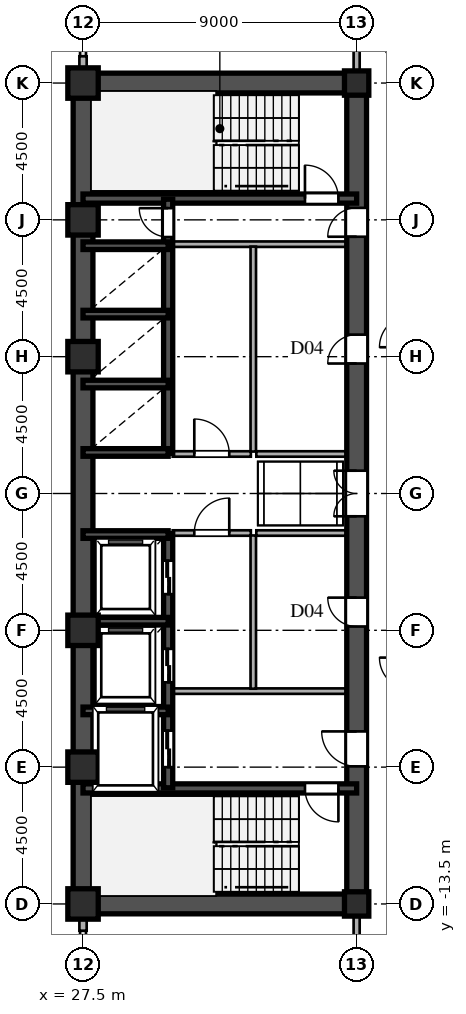
"""IFC4 building model, lengths in metres.
Left out: names, types, materials, properties, quantities, classifications, styles, units other than length and angle.
Written with IfcOpenShell. Run it as: python <this file> out.ifc"""

import sys

from ifc_helpers import new_model, si_unit, direction, frame, frame_2d, origin, origin_2d, place, context, subcontext, project, spatial, rectangle, hollow_rectangle, i_section, extrude, source, transform, mapped, element, fill, save


model = new_model("IFC4")
c1 = context("Model", 3, precision=1e-05, world=origin(), true_north=direction((0.0, 1.0)))
c2 = subcontext(c1, "Body", "Model", "MODEL_VIEW")
j1 = project(units=[si_unit("LENGTHUNIT", "METRE"), si_unit("PLANEANGLEUNIT", "RADIAN")], contexts=[c1])
p1 = place(None, origin())
s1 = spatial("IfcSite", under=j1, at=p1, CompositionType="ELEMENT")
p2 = place(p1, origin())
s2 = spatial("IfcBuilding", under=s1, at=p2, CompositionType="ELEMENT")
p3 = place(p2, frame((0.0, 0.0, 83.7)))
s3 = spatial("IfcBuildingStorey", under=s2, at=p3, CompositionType="ELEMENT", Elevation=83.7)
m1 = source(origin(), c2, "Body", "SweptSolid", [
    extrude(hollow_rectangle(XDim=1.0, YDim=1.0, WallThickness=0.042, at=origin_2d()), origin(), (0.0, 0.0, 1.0), 3.6),
])
for number, where, z_axis, x_axis in (
    (1, (27.5, -13.5, 0.0), (0.0, 0.0, 1.0), (1.0, 0.0, 0.0)),
    (2, (27.5, -9.0, 0.0), (0.0, 0.0, 1.0), (1.0, 0.0, 0.0)),
    (3, (27.5, -4.5, 0.0), (0.0, 0.0, 1.0), (1.0, 0.0, 0.0)),
    (4, (27.5, 4.5, 0.0), (0.0, 0.0, 1.0), (1.0, 0.0, 0.0)),
    (5, (27.5, 9.0, 0.0), (0.0, 0.0, 1.0), (1.0, 0.0, 0.0)),
    (6, (27.5, 13.5, 0.0), (0.0, 0.0, 1.0), (1.0, 0.0, 0.0)),
):
    element("IfcColumn", number, at=place(p3, frame(where, z_axis=z_axis, x_axis=x_axis)), inside=s3, PredefinedType="COLUMN", context=c2, shape_type="MappedRepresentation", body=[
        mapped(m1, transform((0.0, 0.0, 0.0), scale=1.0)),
    ])
m2 = source(origin(), c2, "Body", "SweptSolid", [
    extrude(i_section(OverallWidth=0.8, OverallDepth=0.8, WebThickness=0.032, FlangeThickness=0.05, at=origin_2d()), origin(), (0.0, 0.0, 1.0), 3.6),
])
for number, where, z_axis, x_axis in (
    (7, (36.5, -13.5, 0.0), (0.0, 0.0, 1.0), (1.0, 0.0, 0.0)),
    (8, (36.5, 13.5, 0.0), (0.0, 0.0, 1.0), (1.0, 0.0, 0.0)),
):
    element("IfcColumn", number, at=place(p3, frame(where, z_axis=z_axis, x_axis=x_axis)), inside=s3, PredefinedType="COLUMN", context=c2, shape_type="MappedRepresentation", body=[
        mapped(m2, transform((0.0, 0.0, 0.0), scale=1.0)),
    ])
for number, where, z_axis, x_axis in (
    (9, (27.5, -14.38, 0.0), (0.0, 0.0, 1.0), (0.0, 1.0, 0.0)),
    (10, (27.5, 13.83, 0.0), (0.0, 0.0, 1.0), (0.0, 1.0, 0.0)),
):
    element("IfcWall", number, at=place(p3, frame(where, z_axis=z_axis, x_axis=x_axis)), inside=s3, PredefinedType="SOLIDWALL", context=c2, shape_type="SweptSolid", body=[
        extrude(rectangle(XDim=0.55, YDim=0.24, at=frame_2d((0.275, 0.0))), origin(), (0.0, 0.0, 1.0), 2.84),
    ])
for number, where, z_axis, x_axis in (
    (11, (27.5, -13.5, 0.0), (0.0, 0.0, 1.0), (0.0, 1.0, 0.0)),
    (12, (27.5, 1.3, 0.0), (0.0, 0.0, 1.0), (0.0, 1.0, 0.0)),
):
    element("IfcWall", number, at=place(p3, frame(where, z_axis=z_axis, x_axis=x_axis)), inside=s3, PredefinedType="SHEAR", context=c2, shape_type="SweptSolid", body=[
        extrude(rectangle(XDim=12.2, YDim=0.65, at=frame_2d((6.1, 0.0))), origin(), (0.0, 0.0, 1.0), 3.34),
    ])
p4 = place(p3, frame((27.5, -1.3, 0.0), z_axis=(0.0, 0.0, 1.0), x_axis=(0.0, 1.0, 0.0)))
e13 = element("IfcWall", 13, at=p4, inside=s3, PredefinedType="SHEAR", context=c2, shape_type="SweptSolid", body=[
    extrude(rectangle(XDim=2.6, YDim=0.65, at=frame_2d((1.3, 0.0))), origin(), (0.0, 0.0, 1.0), 3.34),
])
for number, where, z_axis, x_axis in (
    (14, (27.5, -13.5, 0.0), (0.0, 0.0, 1.0), (1.0, 0.0, 0.0)),
    (15, (27.5, 13.5, 0.0), (0.0, 0.0, 1.0), (1.0, 0.0, 0.0)),
):
    element("IfcWall", number, at=place(p3, frame(where, z_axis=z_axis, x_axis=x_axis)), inside=s3, PredefinedType="SHEAR", context=c2, shape_type="SweptSolid", body=[
        extrude(rectangle(XDim=9.0, YDim=0.65, at=frame_2d((4.5, 0.0))), origin(), (0.0, 0.0, 1.0), 3.34),
    ])
p5 = place(p3, frame((36.5, -13.65, 0.0), z_axis=(0.0, 0.0, 1.0), x_axis=(0.0, 1.0, 0.0)))
e16 = element("IfcWall", 16, at=p5, inside=s3, PredefinedType="SHEAR", context=c2, shape_type="SweptSolid", body=[
    extrude(rectangle(XDim=7.15, YDim=0.65, at=frame_2d((3.575, 0.0))), origin(), (0.0, 0.0, 1.0), 3.34),
])
p6 = place(p5, frame((4.675, 0.0, 0.0)))
e17 = element("IfcOpeningElement", 17, at=p6, cuts=e16, PredefinedType="OPENING", context=c2, shape_type="SweptSolid", body=[
    extrude(rectangle(XDim=1.15, YDim=2.2, at=frame_2d((0.575, 1.1))), frame((0.0, 0.335, 0.0), z_axis=(0.0, -1.0, 0.0), x_axis=(1.0, 0.0, 0.0)), (0.0, 0.0, 1.0), 0.67),
])
p7 = place(p3, frame((36.5, -1.3, 0.0), z_axis=(0.0, 0.0, 1.0), x_axis=(0.0, 1.0, 0.0)))
e18 = element("IfcWall", 18, at=p7, inside=s3, PredefinedType="SHEAR", context=c2, shape_type="SweptSolid", body=[
    extrude(rectangle(XDim=2.6, YDim=0.65, at=frame_2d((1.3, 0.0))), origin(), (0.0, 0.0, 1.0), 3.34),
])
p8 = place(p7, frame((0.55, 0.0, 0.0)))
e19 = element("IfcOpeningElement", 19, at=p8, cuts=e18, PredefinedType="OPENING", context=c2, shape_type="SweptSolid", body=[
    extrude(rectangle(XDim=1.5, YDim=2.3, at=frame_2d((0.75, 1.15))), frame((0.0, 0.335, 0.0), z_axis=(0.0, -1.0, 0.0), x_axis=(1.0, 0.0, 0.0)), (0.0, 0.0, 1.0), 0.67),
])
p9 = place(p3, frame((36.5, 8.2, 0.0), z_axis=(0.0, 0.0, 1.0), x_axis=(0.0, 1.0, 0.0)))
e20 = element("IfcWall", 20, at=p9, inside=s3, PredefinedType="SHEAR", context=c2, shape_type="SweptSolid", body=[
    extrude(rectangle(XDim=5.45, YDim=0.65, at=frame_2d((2.725, 0.0))), origin(), (0.0, 0.0, 1.0), 3.34),
])
p10 = place(p9, frame((0.245, 0.0, 0.0)))
e21 = element("IfcOpeningElement", 21, at=p10, cuts=e20, PredefinedType="OPENING", context=c2, shape_type="SweptSolid", body=[
    extrude(rectangle(XDim=0.95, YDim=2.15, at=frame_2d((0.475, 1.075))), frame((0.0, 0.335, 0.0), z_axis=(0.0, -1.0, 0.0), x_axis=(1.0, 0.0, 0.0)), (0.0, 0.0, 1.0), 0.67),
])
p11 = place(p3, frame((36.5, -6.5, 0.0), z_axis=(0.0, 0.0, 1.0), x_axis=(0.0, 1.0, 0.0)))
e22 = element("IfcWall", 22, at=p11, inside=s3, PredefinedType="SHEAR", context=c2, shape_type="SweptSolid", body=[
    extrude(rectangle(XDim=5.2, YDim=0.65, at=frame_2d((2.6, 0.0))), origin(), (0.0, 0.0, 1.0), 3.34),
])
p12 = place(p11, frame((2.125, 0.0, 0.0)))
e23 = element("IfcOpeningElement", 23, at=p12, cuts=e22, PredefinedType="OPENING", context=c2, shape_type="SweptSolid", body=[
    extrude(rectangle(XDim=0.95, YDim=2.15, at=frame_2d((0.475, 1.075))), frame((0.0, 0.335, 0.0), z_axis=(0.0, -1.0, 0.0), x_axis=(1.0, 0.0, 0.0)), (0.0, 0.0, 1.0), 0.67),
])
p13 = place(p3, frame((36.5, 1.3, 0.0), z_axis=(0.0, 0.0, 1.0), x_axis=(0.0, 1.0, 0.0)))
e24 = element("IfcWall", 24, at=p13, inside=s3, PredefinedType="SHEAR", context=c2, shape_type="SweptSolid", body=[
    extrude(rectangle(XDim=6.9, YDim=0.65, at=frame_2d((3.45, 0.0))), origin(), (0.0, 0.0, 1.0), 3.34),
])
p14 = place(p13, frame((2.975, 0.0, 0.0)))
e25 = element("IfcOpeningElement", 25, at=p14, cuts=e24, PredefinedType="OPENING", context=c2, shape_type="SweptSolid", body=[
    extrude(rectangle(XDim=0.95, YDim=2.15, at=frame_2d((0.475, 1.075))), frame((0.0, 0.335, 0.0), z_axis=(0.0, -1.0, 0.0), x_axis=(1.0, 0.0, 0.0)), (0.0, 0.0, 1.0), 0.67),
])
p15 = place(p3, frame((27.5, -9.7, 0.0), z_axis=(0.0, 0.0, 1.0), x_axis=(1.0, 0.0, 0.0)))
e26 = element("IfcWall", 26, at=p15, inside=s3, PredefinedType="SHEAR", context=c2, shape_type="SweptSolid", body=[
    extrude(rectangle(XDim=9.0, YDim=0.3, at=frame_2d((4.5, 0.0))), origin(), (0.0, 0.0, 1.0), 3.34),
])
p16 = place(p15, frame((7.3, 0.0, 0.0)))
e27 = element("IfcOpeningElement", 27, at=p16, cuts=e26, PredefinedType="OPENING", context=c2, shape_type="SweptSolid", body=[
    extrude(rectangle(XDim=1.1, YDim=2.2, at=frame_2d((0.55, 1.1))), frame((0.0, 0.16, 0.0), z_axis=(0.0, -1.0, 0.0), x_axis=(1.0, 0.0, 0.0)), (0.0, 0.0, 1.0), 0.32),
])
p17 = place(p3, frame((27.5, 9.7, 0.0), z_axis=(0.0, 0.0, 1.0), x_axis=(1.0, 0.0, 0.0)))
e28 = element("IfcWall", 28, at=p17, inside=s3, PredefinedType="SHEAR", context=c2, shape_type="SweptSolid", body=[
    extrude(rectangle(XDim=9.0, YDim=0.3, at=frame_2d((4.5, 0.0))), origin(), (0.0, 0.0, 1.0), 3.34),
])
p18 = place(p17, frame((7.3, 0.0, 0.0)))
e29 = element("IfcOpeningElement", 29, at=p18, cuts=e28, PredefinedType="OPENING", context=c2, shape_type="SweptSolid", body=[
    extrude(rectangle(XDim=1.1, YDim=2.2, at=frame_2d((0.55, 1.1))), frame((0.0, 0.16, 0.0), z_axis=(0.0, -1.0, 0.0), x_axis=(1.0, 0.0, 0.0)), (0.0, 0.0, 1.0), 0.32),
])
for number, where, z_axis, x_axis in (
    (30, (27.5, -7.15, 0.0), (0.0, 0.0, 1.0), (1.0, 0.0, 0.0)),
    (31, (27.5, -4.2, 0.0), (0.0, 0.0, 1.0), (1.0, 0.0, 0.0)),
    (32, (27.5, -1.35, 0.0), (0.0, 0.0, 1.0), (1.0, 0.0, 0.0)),
    (33, (27.5, 1.35, 0.0), (0.0, 0.0, 1.0), (1.0, 0.0, 0.0)),
    (34, (27.5, 3.6, 0.0), (0.0, 0.0, 1.0), (1.0, 0.0, 0.0)),
    (35, (27.5, 5.9, 0.0), (0.0, 0.0, 1.0), (1.0, 0.0, 0.0)),
    (36, (27.5, 8.15, 0.0), (0.0, 0.0, 1.0), (1.0, 0.0, 0.0)),
):
    element("IfcWall", number, at=place(p3, frame(where, z_axis=z_axis, x_axis=x_axis)), inside=s3, PredefinedType="SHEAR", context=c2, shape_type="SweptSolid", body=[
        extrude(rectangle(XDim=2.8, YDim=0.25, at=frame_2d((1.4, 0.0))), origin(), (0.0, 0.0, 1.0), 3.34),
    ])
p19 = place(p3, frame((30.3, -9.68, 0.0), z_axis=(0.0, 0.0, 1.0), x_axis=(0.0, 1.0, 0.0)))
e37 = element("IfcWall", 37, at=p19, inside=s3, PredefinedType="SHEAR", context=c2, shape_type="SweptSolid", body=[
    extrude(rectangle(XDim=2.56, YDim=0.3, at=frame_2d((1.28, 0.0))), origin(), (0.0, 0.0, 1.0), 3.34),
])
p20 = place(p19, frame((0.68, 0.0, 0.0)))
e38 = element("IfcOpeningElement", 38, at=p20, cuts=e37, PredefinedType="OPENING", context=c2, shape_type="SweptSolid", body=[
    extrude(rectangle(XDim=1.2, YDim=2.25, at=frame_2d((0.6, 1.125))), frame((0.0, 0.16, 0.0), z_axis=(0.0, -1.0, 0.0), x_axis=(1.0, 0.0, 0.0)), (0.0, 0.0, 1.0), 0.32),
])
p21 = place(p3, frame((30.3, -7.12, 0.0), z_axis=(0.0, 0.0, 1.0), x_axis=(0.0, 1.0, 0.0)))
e39 = element("IfcWall", 39, at=p21, inside=s3, PredefinedType="SHEAR", context=c2, shape_type="SweptSolid", body=[
    extrude(rectangle(XDim=2.92, YDim=0.3, at=frame_2d((1.46, 0.0))), origin(), (0.0, 0.0, 1.0), 3.34),
])
p22 = place(p21, frame((0.91, 0.0, 0.0)))
e40 = element("IfcOpeningElement", 40, at=p22, cuts=e39, PredefinedType="OPENING", context=c2, shape_type="SweptSolid", body=[
    extrude(rectangle(XDim=1.1, YDim=2.2, at=frame_2d((0.55, 1.1))), frame((0.0, 0.16, 0.0), z_axis=(0.0, -1.0, 0.0), x_axis=(1.0, 0.0, 0.0)), (0.0, 0.0, 1.0), 0.32),
])
p23 = place(p3, frame((30.3, -4.2, 0.0), z_axis=(0.0, 0.0, 1.0), x_axis=(0.0, 1.0, 0.0)))
e41 = element("IfcWall", 41, at=p23, inside=s3, PredefinedType="SHEAR", context=c2, shape_type="SweptSolid", body=[
    extrude(rectangle(XDim=2.88, YDim=0.3, at=frame_2d((1.44, 0.0))), origin(), (0.0, 0.0, 1.0), 3.34),
])
p24 = place(p23, frame((0.89, 0.0, 0.0)))
e42 = element("IfcOpeningElement", 42, at=p24, cuts=e41, PredefinedType="OPENING", context=c2, shape_type="SweptSolid", body=[
    extrude(rectangle(XDim=1.1, YDim=2.2, at=frame_2d((0.55, 1.1))), frame((0.0, 0.16, 0.0), z_axis=(0.0, -1.0, 0.0), x_axis=(1.0, 0.0, 0.0)), (0.0, 0.0, 1.0), 0.32),
])
p25 = place(p3, frame((30.3, 1.32, 0.0), z_axis=(0.0, 0.0, 1.0), x_axis=(0.0, 1.0, 0.0)))
e43 = element("IfcWall", 43, at=p25, inside=s3, PredefinedType="SHEAR", context=c2, shape_type="SweptSolid", body=[
    extrude(rectangle(XDim=2.28, YDim=0.3, at=frame_2d((1.14, 0.0))), origin(), (0.0, 0.0, 1.0), 3.34),
])
p26 = place(p3, frame((30.3, 3.6, 0.0), z_axis=(0.0, 0.0, 1.0), x_axis=(0.0, 1.0, 0.0)))
e44 = element("IfcWall", 44, at=p26, inside=s3, PredefinedType="SHEAR", context=c2, shape_type="SweptSolid", body=[
    extrude(rectangle(XDim=2.3, YDim=0.3, at=frame_2d((1.15, 0.0))), origin(), (0.0, 0.0, 1.0), 3.34),
])
p27 = place(p3, frame((30.3, 5.9, 0.0), z_axis=(0.0, 0.0, 1.0), x_axis=(0.0, 1.0, 0.0)))
e45 = element("IfcWall", 45, at=p27, inside=s3, PredefinedType="SHEAR", context=c2, shape_type="SweptSolid", body=[
    extrude(rectangle(XDim=2.25, YDim=0.3, at=frame_2d((1.125, 0.0))), origin(), (0.0, 0.0, 1.0), 3.34),
])
p28 = place(p3, frame((30.3, 8.15, 0.0), z_axis=(0.0, 0.0, 1.0), x_axis=(0.0, 1.0, 0.0)))
e46 = element("IfcWall", 46, at=p28, inside=s3, PredefinedType="SHEAR", context=c2, shape_type="SweptSolid", body=[
    extrude(rectangle(XDim=1.53, YDim=0.3, at=frame_2d((0.765, 0.0))), origin(), (0.0, 0.0, 1.0), 3.34),
])
p29 = place(p28, frame((0.285, 0.0, 0.0)))
e47 = element("IfcOpeningElement", 47, at=p29, cuts=e46, PredefinedType="OPENING", context=c2, shape_type="SweptSolid", body=[
    extrude(rectangle(XDim=0.95, YDim=2.15, at=frame_2d((0.475, 1.075))), frame((0.0, 0.16, 0.0), z_axis=(0.0, -1.0, 0.0), x_axis=(1.0, 0.0, 0.0)), (0.0, 0.0, 1.0), 0.32),
])
for number, where, z_axis, x_axis in (
    (48, (30.45, -6.5, 0.0), (0.0, 0.0, 1.0), (1.0, 0.0, 0.0)),
    (49, (30.45, 8.2, 0.0), (0.0, 0.0, 1.0), (1.0, 0.0, 0.0)),
):
    element("IfcWall", number, at=place(p3, frame(where, z_axis=z_axis, x_axis=x_axis)), inside=s3, PredefinedType="PARTITIONING", context=c2, shape_type="SweptSolid", body=[
        extrude(rectangle(XDim=5.7, YDim=0.18, at=frame_2d((2.85, 0.0))), origin(), (0.0, 0.0, 1.0), 3.34),
    ])
p30 = place(p3, frame((33.1, -6.42, 0.0), z_axis=(0.0, 0.0, 1.0), x_axis=(0.0, 1.0, 0.0)))
e50 = element("IfcWall", 50, at=p30, inside=s3, PredefinedType="PARTITIONING", context=c2, shape_type="SweptSolid", body=[
    extrude(rectangle(XDim=5.04, YDim=0.18, at=frame_2d((2.52, 0.0))), origin(), (0.0, 0.0, 1.0), 3.34),
])
p31 = place(p3, frame((33.1, 1.38, 0.0), z_axis=(0.0, 0.0, 1.0), x_axis=(0.0, 1.0, 0.0)))
e51 = element("IfcWall", 51, at=p31, inside=s3, PredefinedType="PARTITIONING", context=c2, shape_type="SweptSolid", body=[
    extrude(rectangle(XDim=6.74, YDim=0.18, at=frame_2d((3.37, 0.0))), origin(), (0.0, 0.0, 1.0), 3.34),
])
p32 = place(p3, frame((30.45, -1.3, 0.0), z_axis=(0.0, 0.0, 1.0), x_axis=(1.0, 0.0, 0.0)))
e52 = element("IfcWall", 52, at=p32, inside=s3, PredefinedType="PARTITIONING", context=c2, shape_type="SweptSolid", body=[
    extrude(rectangle(XDim=2.57, YDim=0.18, at=frame_2d((1.285, 0.0))), origin(), (0.0, 0.0, 1.0), 3.34),
])
p33 = place(p32, frame((0.71, 0.0, 0.0)))
e53 = element("IfcOpeningElement", 53, at=p33, cuts=e52, PredefinedType="OPENING", context=c2, shape_type="SweptSolid", body=[
    extrude(rectangle(XDim=1.15, YDim=2.2, at=frame_2d((0.575, 1.1))), frame((0.0, 0.1, 0.0), z_axis=(0.0, -1.0, 0.0), x_axis=(1.0, 0.0, 0.0)), (0.0, 0.0, 1.0), 0.2),
])
p34 = place(p3, frame((30.45, 1.3, 0.0), z_axis=(0.0, 0.0, 1.0), x_axis=(1.0, 0.0, 0.0)))
e54 = element("IfcWall", 54, at=p34, inside=s3, PredefinedType="PARTITIONING", context=c2, shape_type="SweptSolid", body=[
    extrude(rectangle(XDim=2.57, YDim=0.18, at=frame_2d((1.285, 0.0))), origin(), (0.0, 0.0, 1.0), 3.34),
])
p35 = place(p34, frame((0.71, 0.0, 0.0)))
e55 = element("IfcOpeningElement", 55, at=p35, cuts=e54, PredefinedType="OPENING", context=c2, shape_type="SweptSolid", body=[
    extrude(rectangle(XDim=1.15, YDim=2.2, at=frame_2d((0.575, 1.1))), frame((0.0, 0.1, 0.0), z_axis=(0.0, -1.0, 0.0), x_axis=(1.0, 0.0, 0.0)), (0.0, 0.0, 1.0), 0.2),
])
for number, where, z_axis, x_axis in (
    (56, (33.2, -1.3, 0.0), (0.0, 0.0, 1.0), (1.0, 0.0, 0.0)),
    (57, (33.2, 1.3, 0.0), (0.0, 0.0, 1.0), (1.0, 0.0, 0.0)),
):
    element("IfcWall", number, at=place(p3, frame(where, z_axis=z_axis, x_axis=x_axis)), inside=s3, PredefinedType="PARTITIONING", context=c2, shape_type="SweptSolid", body=[
        extrude(rectangle(XDim=2.95, YDim=0.18, at=frame_2d((1.475, 0.0))), origin(), (0.0, 0.0, 1.0), 3.34),
    ])
for number, where, z_axis, x_axis in (
    (58, (36.5, -15.515, 0.0), (0.0, 0.0, 1.0), (0.0, 1.0, 0.0)),
    (59, (36.5, 13.83, 0.0), (0.0, 0.0, 1.0), (0.0, 1.0, 0.0)),
):
    element("IfcWall", number, at=place(p3, frame(where, z_axis=z_axis, x_axis=x_axis)), inside=s3, PredefinedType="PARTITIONING", context=c2, shape_type="SweptSolid", body=[
        extrude(rectangle(XDim=1.685, YDim=0.2, at=frame_2d((0.842, 0.0))), origin(), (0.0, 0.0, 1.0), 2.44),
    ])
m3 = source(origin(), c2, "Body", "SweptSolid", [
    extrude(rectangle(XDim=1.15, YDim=2.2, at=frame_2d((0.575, 1.1))), frame((0.0, 0.025, 0.0), z_axis=(0.0, -1.0, 0.0), x_axis=(1.0, 0.0, 0.0)), (0.0, 0.0, 1.0), 0.05),
])
p36 = place(p6, origin())
e60 = element("IfcDoor", 60, at=p36, inside=s3, OperationType="SINGLE_SWING_RIGHT", PredefinedType="DOOR", context=c2, shape_type="MappedRepresentation", body=[
    mapped(m3, transform((0.0, 0.0, 0.0), scale=1.0)),
])
fill(e17, e60)
m4 = source(origin(), c2, "Body", "SweptSolid", [
    extrude(rectangle(XDim=1.5, YDim=2.3, at=frame_2d((0.75, 1.15))), frame((0.0, 0.025, 0.0), z_axis=(0.0, -1.0, 0.0), x_axis=(1.0, 0.0, 0.0)), (0.0, 0.0, 1.0), 0.05),
])
p37 = place(p8, origin())
e61 = element("IfcDoor", 61, at=p37, inside=s3, OperationType="DOUBLE_SWING_LEFT", PredefinedType="DOOR", context=c2, shape_type="MappedRepresentation", body=[
    mapped(m4, transform((0.0, 0.0, 0.0), scale=1.0)),
])
fill(e19, e61)
m5 = source(origin(), c2, "Body", "SweptSolid", [
    extrude(rectangle(XDim=0.95, YDim=2.15, at=frame_2d((0.475, 1.075))), frame((0.0, 0.025, 0.0), z_axis=(0.0, -1.0, 0.0), x_axis=(1.0, 0.0, 0.0)), (0.0, 0.0, 1.0), 0.05),
])
p38 = place(p10, origin())
e62 = element("IfcDoor", 62, at=p38, inside=s3, OperationType="SINGLE_SWING_LEFT", PredefinedType="DOOR", context=c2, shape_type="MappedRepresentation", body=[
    mapped(m5, transform((0.0, 0.0, 0.0), scale=1.0)),
])
fill(e21, e62)
p39 = place(p12, origin())
e63 = element("IfcDoor", 63, at=p39, inside=s3, OperationType="SINGLE_SWING_RIGHT", PredefinedType="DOOR", context=c2, shape_type="MappedRepresentation", body=[
    mapped(m5, transform((0.0, 0.0, 0.0), scale=1.0)),
])
fill(e23, e63)
p40 = place(p14, origin())
e64 = element("IfcDoor", 64, at=p40, inside=s3, OperationType="SINGLE_SWING_LEFT", PredefinedType="DOOR", context=c2, shape_type="MappedRepresentation", body=[
    mapped(m5, transform((0.0, 0.0, 0.0), scale=1.0)),
])
fill(e25, e64)
m6 = source(origin(), c2, "Body", "SweptSolid", [
    extrude(rectangle(XDim=1.1, YDim=2.2, at=frame_2d((0.55, 1.1))), frame((0.0, 0.025, 0.0), z_axis=(0.0, -1.0, 0.0), x_axis=(1.0, 0.0, 0.0)), (0.0, 0.0, 1.0), 0.05),
])
p41 = place(p16, frame((1.1, 0.0, 0.0), z_axis=(0.0, 0.0, 1.0), x_axis=(-1.0, 0.0, 0.0)))
e65 = element("IfcDoor", 65, at=p41, inside=s3, OperationType="SINGLE_SWING_RIGHT", PredefinedType="DOOR", context=c2, shape_type="MappedRepresentation", body=[
    mapped(m6, transform((0.0, 0.0, 0.0), scale=1.0)),
])
fill(e27, e65)
p42 = place(p18, origin())
e66 = element("IfcDoor", 66, at=p42, inside=s3, OperationType="SINGLE_SWING_LEFT", PredefinedType="DOOR", context=c2, shape_type="MappedRepresentation", body=[
    mapped(m6, transform((0.0, 0.0, 0.0), scale=1.0)),
])
fill(e29, e66)
m7 = source(origin(), c2, "Body", "SweptSolid", [
    extrude(rectangle(XDim=1.2, YDim=2.25, at=frame_2d((0.6, 1.125))), frame((0.0, 0.025, 0.0), z_axis=(0.0, -1.0, 0.0), x_axis=(1.0, 0.0, 0.0)), (0.0, 0.0, 1.0), 0.05),
])
p43 = place(p20, origin())
e67 = element("IfcDoor", 67, at=p43, inside=s3, OperationType="DOUBLE_DOOR_SLIDING", PredefinedType="DOOR", context=c2, shape_type="MappedRepresentation", body=[
    mapped(m7, transform((0.0, 0.0, 0.0), scale=1.0)),
])
fill(e38, e67)
m8 = source(origin(), c2, "Body", "SweptSolid", [
    extrude(rectangle(XDim=1.1, YDim=2.2, at=frame_2d((0.55, 1.1))), frame((0.0, 0.025, 0.0), z_axis=(0.0, -1.0, 0.0), x_axis=(1.0, 0.0, 0.0)), (0.0, 0.0, 1.0), 0.05),
])
p44 = place(p22, origin())
e68 = element("IfcDoor", 68, at=p44, inside=s3, OperationType="DOUBLE_DOOR_SLIDING", PredefinedType="DOOR", context=c2, shape_type="MappedRepresentation", body=[
    mapped(m8, transform((0.0, 0.0, 0.0), scale=1.0)),
])
fill(e40, e68)
p45 = place(p24, origin())
e69 = element("IfcDoor", 69, at=p45, inside=s3, OperationType="DOUBLE_DOOR_SLIDING", PredefinedType="DOOR", context=c2, shape_type="MappedRepresentation", body=[
    mapped(m8, transform((0.0, 0.0, 0.0), scale=1.0)),
])
fill(e42, e69)
p46 = place(p29, origin())
e70 = element("IfcDoor", 70, at=p46, inside=s3, OperationType="SINGLE_SWING_RIGHT", PredefinedType="DOOR", context=c2, shape_type="MappedRepresentation", body=[
    mapped(m5, transform((0.0, 0.0, 0.0), scale=1.0)),
])
fill(e47, e70)
p47 = place(p33, origin())
e71 = element("IfcDoor", 71, at=p47, inside=s3, OperationType="SINGLE_SWING_RIGHT", PredefinedType="DOOR", context=c2, shape_type="MappedRepresentation", body=[
    mapped(m3, transform((0.0, 0.0, 0.0), scale=1.0)),
])
fill(e53, e71)
p48 = place(p35, origin())
e72 = element("IfcDoor", 72, at=p48, inside=s3, OperationType="SINGLE_SWING_LEFT", PredefinedType="DOOR", context=c2, shape_type="MappedRepresentation", body=[
    mapped(m3, transform((0.0, 0.0, 0.0), scale=1.0)),
])
fill(e55, e72)
save(model, sys.argv[1])
